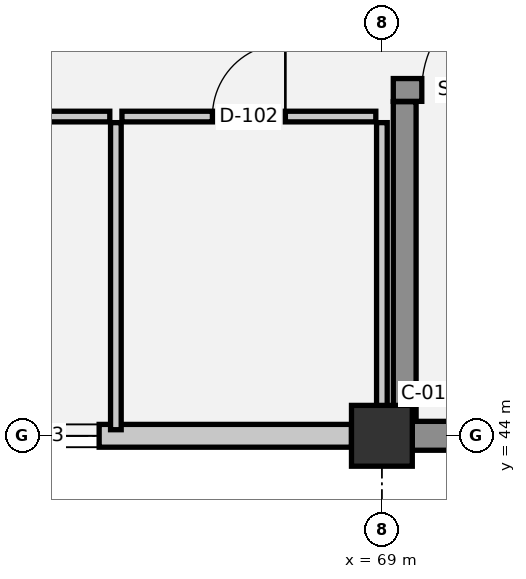
"""IFC4 building model, lengths in metres.
Left out: names, types, materials, properties, quantities, classifications, styles, units other than length and angle.
Written with IfcOpenShell. Run it as: python <this file> out.ifc"""

import sys

from ifc_helpers import new_model, si_unit, direction, frame, frame_2d, origin, origin_2d, place, context, subcontext, project, spatial, rectangle, extrude, element, fill, save


model = new_model("IFC4")
c1 = context("Model", 3, precision=1e-05, world=origin(), true_north=direction((0.0, 1.0)))
c2 = subcontext(c1, "Body", "Model", "MODEL_VIEW")
j1 = project(units=[si_unit("LENGTHUNIT", "METRE"), si_unit("PLANEANGLEUNIT", "RADIAN")], contexts=[c1])
p1 = place(None, origin())
s1 = spatial("IfcSite", under=j1, at=p1, CompositionType="ELEMENT")
p2 = place(p1, origin())
s2 = spatial("IfcBuilding", under=s1, at=p2, CompositionType="ELEMENT")
p3 = place(p2, origin())
s3 = spatial("IfcBuildingStorey", under=s2, at=p3, CompositionType="ELEMENT", Elevation=0.0)
p4 = place(p3, frame((69.0, 44.0, 0.0), z_axis=(0.0, 0.0, 1.0), x_axis=(1.0, 0.0, 0.0)))
e1 = element("IfcColumn", 1, at=p4, inside=s3, PredefinedType="COLUMN", context=c2, shape_type="SweptSolid", body=[
    extrude(rectangle(XDim=0.8, YDim=0.8, at=origin_2d()), origin(), (0.0, 0.0, 1.0), 5.4),
])
p5 = place(p3, frame((76.6, 44.0, 0.0), z_axis=(0.0, 0.0, 1.0), x_axis=(-1.0, 0.0, 0.0)))
e2 = element("IfcWall", 2, at=p5, inside=s3, PredefinedType="STANDARD", context=c2, shape_type="SweptSolid", body=[
    extrude(rectangle(XDim=7.2, YDim=0.38, at=frame_2d((3.6, 0.0))), origin(), (0.0, 0.0, 1.0), 4.13),
])
p6 = place(p5, frame((3.075, 0.0, 0.95)))
e3 = element("IfcOpeningElement", 3, at=p6, cuts=e2, PredefinedType="OPENING", context=c2, shape_type="SweptSolid", body=[
    extrude(rectangle(XDim=1.05, YDim=1.6, at=frame_2d((0.525, 0.8))), frame((0.0, 0.2, 0.0), z_axis=(0.0, -1.0, 0.0), x_axis=(1.0, 0.0, 0.0)), (0.0, 0.0, 1.0), 0.4),
])
p7 = place(p3, frame((68.6, 44.0, 0.0), z_axis=(0.0, 0.0, 1.0), x_axis=(-1.0, 0.0, 0.0)))
e4 = element("IfcWall", 4, at=p7, inside=s3, PredefinedType="SOLIDWALL", context=c2, shape_type="SweptSolid", body=[
    extrude(rectangle(XDim=6.2, YDim=0.3, at=frame_2d((3.1, 0.0))), origin(), (0.0, 0.0, 1.0), 4.13),
])
p8 = place(p7, frame((3.32, 0.0, 0.9)))
e5 = element("IfcOpeningElement", 5, at=p8, cuts=e4, PredefinedType="OPENING", context=c2, shape_type="SweptSolid", body=[
    extrude(rectangle(XDim=1.8, YDim=2.0, at=frame_2d((0.9, 1.0))), frame((0.0, 0.16, 0.0), z_axis=(0.0, -1.0, 0.0), x_axis=(1.0, 0.0, 0.0)), (0.0, 0.0, 1.0), 0.32),
])
p9 = place(p3, frame((69.15, 48.55, 0.0), z_axis=(0.0, 0.0, 1.0), x_axis=(1.0, 0.0, 0.0)))
e6 = element("IfcWall", 6, at=p9, inside=s3, PredefinedType="SHEAR", context=c2, shape_type="SweptSolid", body=[
    extrude(rectangle(XDim=7.7, YDim=0.3, at=frame_2d((3.85, 0.0))), origin(), (0.0, 0.0, 1.0), 5.1),
])
p10 = place(p9, frame((0.375, 0.0, 0.0)))
e7 = element("IfcOpeningElement", 7, at=p10, cuts=e6, PredefinedType="OPENING", context=c2, shape_type="SweptSolid", body=[
    extrude(rectangle(XDim=1.35, YDim=2.2, at=frame_2d((0.675, 1.1))), frame((0.0, 0.16, 0.0), z_axis=(0.0, -1.0, 0.0), x_axis=(1.0, 0.0, 0.0)), (0.0, 0.0, 1.0), 0.32),
])
p11 = place(p3, frame((69.3, 48.395, 0.0), z_axis=(0.0, 0.0, 1.0), x_axis=(0.0, -1.0, 0.0)))
e8 = element("IfcWall", 8, at=p11, inside=s3, PredefinedType="SHEAR", context=c2, shape_type="SweptSolid", body=[
    extrude(rectangle(XDim=4.2, YDim=0.3, at=frame_2d((2.1, 0.0))), origin(), (0.0, 0.0, 1.0), 5.1),
])
p12 = place(p3, frame((62.08, 48.2, 0.0), z_axis=(0.0, 0.0, 1.0), x_axis=(1.0, 0.0, 0.0)))
e9 = element("IfcWall", 9, at=p12, inside=s3, PredefinedType="PLUMBINGWALL", context=c2, shape_type="SweptSolid", body=[
    extrude(rectangle(XDim=3.34, YDim=0.14, at=frame_2d((1.67, 0.0))), origin(), (0.0, 0.0, 1.0), 5.04),
])
p13 = place(p12, frame((1.21, 0.0, 0.0)))
e10 = element("IfcOpeningElement", 10, at=p13, cuts=e9, PredefinedType="OPENING", context=c2, shape_type="SweptSolid", body=[
    extrude(rectangle(XDim=0.92, YDim=2.1, at=frame_2d((0.46, 1.05))), frame((0.0, 0.08, 0.0), z_axis=(0.0, -1.0, 0.0), x_axis=(1.0, 0.0, 0.0)), (0.0, 0.0, 1.0), 0.16),
])
p14 = place(p3, frame((65.58, 48.2, 0.0), z_axis=(0.0, 0.0, 1.0), x_axis=(1.0, 0.0, 0.0)))
e11 = element("IfcWall", 11, at=p14, inside=s3, PredefinedType="PLUMBINGWALL", context=c2, shape_type="SweptSolid", body=[
    extrude(rectangle(XDim=3.34, YDim=0.14, at=frame_2d((1.67, 0.0))), origin(), (0.0, 0.0, 1.0), 5.04),
])
p15 = place(p14, frame((1.19, 0.0, 0.0)))
e12 = element("IfcOpeningElement", 12, at=p15, cuts=e11, PredefinedType="OPENING", context=c2, shape_type="SweptSolid", body=[
    extrude(rectangle(XDim=0.96, YDim=2.1, at=frame_2d((0.48, 1.05))), frame((0.0, 0.08, 0.0), z_axis=(0.0, -1.0, 0.0), x_axis=(1.0, 0.0, 0.0)), (0.0, 0.0, 1.0), 0.16),
])
p16 = place(p3, frame((65.5, 44.08, 0.0), z_axis=(0.0, 0.0, 1.0), x_axis=(0.0, 1.0, 0.0)))
e13 = element("IfcWall", 13, at=p16, inside=s3, PredefinedType="PLUMBINGWALL", context=c2, shape_type="SweptSolid", body=[
    extrude(rectangle(XDim=4.04, YDim=0.14, at=frame_2d((2.02, 0.0))), origin(), (0.0, 0.0, 1.0), 5.04),
])
p17 = place(p3, frame((69.0, 44.08, 0.0), z_axis=(0.0, 0.0, 1.0), x_axis=(0.0, 1.0, 0.0)))
e14 = element("IfcWall", 14, at=p17, inside=s3, PredefinedType="PLUMBINGWALL", context=c2, shape_type="SweptSolid", body=[
    extrude(rectangle(XDim=4.04, YDim=0.14, at=frame_2d((2.02, 0.0))), origin(), (0.0, 0.0, 1.0), 4.4),
])
p18 = place(p8, origin())
e15 = element("IfcWindow", 15, at=p18, inside=s3, PartitioningType="SINGLE_PANEL", PredefinedType="WINDOW", context=c2, shape_type="SweptSolid", body=[
    extrude(rectangle(XDim=1.8, YDim=2.0, at=frame_2d((0.9, 1.0))), frame((0.0, 0.03, 0.0), z_axis=(0.0, -1.0, 0.0), x_axis=(1.0, 0.0, 0.0)), (0.0, 0.0, 1.0), 0.06),
])
fill(e5, e15)
p19 = place(p10, origin())
e16 = element("IfcDoor", 16, at=p19, inside=s3, OperationType="SINGLE_SWING_RIGHT", PredefinedType="DOOR", context=c2, shape_type="SweptSolid", body=[
    extrude(rectangle(XDim=1.35, YDim=2.2, at=frame_2d((0.675, 1.1))), frame((0.0, 0.025, 0.0), z_axis=(0.0, -1.0, 0.0), x_axis=(1.0, 0.0, 0.0)), (0.0, 0.0, 1.0), 0.05),
])
fill(e7, e16)
p20 = place(p15, origin())
e17 = element("IfcDoor", 17, at=p20, inside=s3, OperationType="SINGLE_SWING_RIGHT", PredefinedType="DOOR", context=c2, shape_type="SweptSolid", body=[
    extrude(rectangle(XDim=0.96, YDim=2.1, at=frame_2d((0.48, 1.05))), frame((0.0, 0.025, 0.0), z_axis=(0.0, -1.0, 0.0), x_axis=(1.0, 0.0, 0.0)), (0.0, 0.0, 1.0), 0.05),
])
fill(e12, e17)
save(model, sys.argv[1])
